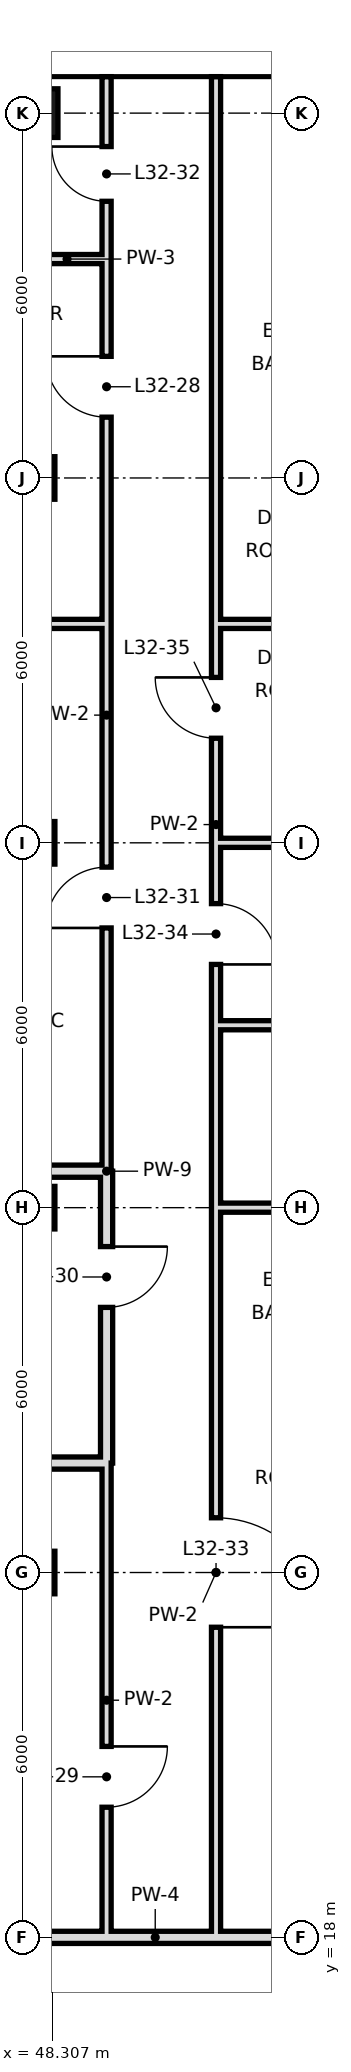
"""IFC4 building model, lengths in metres.
Left out: names, types, materials, properties, quantities, classifications, styles, units other than length and angle.
Written with IfcOpenShell. Run it as: python <this file> out.ifc"""

import sys

from ifc_helpers import new_model, si_unit, direction, frame, frame_2d, origin, origin_2d, place, context, subcontext, project, spatial, rectangle, hollow_rectangle, extrude, element, fill, save


model = new_model("IFC4")
c1 = context("Model", 3, precision=1e-05, world=origin(), true_north=direction((0.0, 1.0)))
c2 = subcontext(c1, "Body", "Model", "MODEL_VIEW")
j1 = project(units=[si_unit("LENGTHUNIT", "METRE"), si_unit("PLANEANGLEUNIT", "RADIAN")], contexts=[c1])
p1 = place(None, origin())
s1 = spatial("IfcSite", under=j1, at=p1, CompositionType="ELEMENT")
p2 = place(p1, origin())
s2 = spatial("IfcBuilding", under=s1, at=p2, CompositionType="ELEMENT")
p3 = place(p2, frame((0.0, 0.0, 143.8)))
s3 = spatial("IfcBuildingStorey", under=s2, at=p3, CompositionType="ELEMENT", Elevation=143.8)
for number, where, z_axis, x_axis in (
    (1, (48.0, 24.0, 0.0), (0.0, 0.0, 1.0), (1.0, 0.0, 0.0)),
    (2, (48.0, 30.0, 0.0), (0.0, 0.0, 1.0), (1.0, 0.0, 0.0)),
    (3, (48.0, 36.0, 0.0), (0.0, 0.0, 1.0), (1.0, 0.0, 0.0)),
    (4, (48.0, 42.0, 0.0), (0.0, 0.0, 1.0), (1.0, 0.0, 0.0)),
):
    element("IfcColumn", number, at=place(p3, frame(where, z_axis=z_axis, x_axis=x_axis)), inside=s3, PredefinedType="COLUMN", context=c2, shape_type="SweptSolid", body=[
        extrude(hollow_rectangle(XDim=0.7, YDim=0.7, WallThickness=0.036, at=origin_2d()), origin(), (0.0, 0.0, 1.0), 3.6),
    ])
p4 = place(p3, frame((48.0, 48.0, 0.0), z_axis=(0.0, 0.0, 1.0), x_axis=(1.0, 0.0, 0.0)))
e5 = element("IfcColumn", 5, at=p4, inside=s3, PredefinedType="COLUMN", context=c2, shape_type="SweptSolid", body=[
    extrude(hollow_rectangle(XDim=0.8, YDim=0.8, WallThickness=0.04, at=origin_2d()), origin(), (0.0, 0.0, 1.0), 3.6),
])
p5 = place(p3, frame((49.2, 25.8, 0.0), z_axis=(0.0, 0.0, 1.0), x_axis=(0.0, 1.0, 0.0)))
e6 = element("IfcWall", 6, at=p5, inside=s3, PredefinedType="SOLIDWALL", context=c2, shape_type="SweptSolid", body=[
    extrude(rectangle(XDim=4.8, YDim=0.2, at=frame_2d((2.4, 0.0))), origin(), (0.0, 0.0, 1.0), 2.72),
])
p6 = place(p5, frame((2.56, 0.0, 0.0)))
e7 = element("IfcOpeningElement", 7, at=p6, cuts=e6, PredefinedType="OPENING", context=c2, shape_type="SweptSolid", body=[
    extrude(rectangle(XDim=1.0, YDim=2.4, at=frame_2d((0.5, 1.2))), frame((0.0, 0.11, 0.0), z_axis=(0.0, -1.0, 0.0), x_axis=(1.0, 0.0, 0.0)), (0.0, 0.0, 1.0), 0.22),
])
p7 = place(p3, frame((49.2, 18.0, 0.0), z_axis=(0.0, 0.0, 1.0), x_axis=(0.0, 1.0, 0.0)))
e8 = element("IfcWall", 8, at=p7, inside=s3, PredefinedType="PARTITIONING", context=c2, shape_type="SweptSolid", body=[
    extrude(rectangle(XDim=7.8, YDim=0.15, at=frame_2d((3.9, 0.0))), origin(), (0.0, 0.0, 1.0), 3.42),
])
p8 = place(p7, frame((2.14, 0.0, 0.0)))
e9 = element("IfcOpeningElement", 9, at=p8, cuts=e8, PredefinedType="OPENING", context=c2, shape_type="SweptSolid", body=[
    extrude(rectangle(XDim=1.0, YDim=2.4, at=frame_2d((0.5, 1.2))), frame((0.0, 0.085, 0.0), z_axis=(0.0, -1.0, 0.0), x_axis=(1.0, 0.0, 0.0)), (0.0, 0.0, 1.0), 0.17),
])
p9 = place(p3, frame((49.2, 30.6, 0.0), z_axis=(0.0, 0.0, 1.0), x_axis=(0.0, 1.0, 0.0)))
e10 = element("IfcWall", 10, at=p9, inside=s3, PredefinedType="PARTITIONING", context=c2, shape_type="SweptSolid", body=[
    extrude(rectangle(XDim=15.0, YDim=0.15, at=frame_2d((7.5, 0.0))), origin(), (0.0, 0.0, 1.0), 3.42),
])
p10 = place(p9, frame((12.4, 0.0, 0.0)))
e11 = element("IfcOpeningElement", 11, at=p10, cuts=e10, PredefinedType="OPENING", context=c2, shape_type="SweptSolid", body=[
    extrude(rectangle(XDim=1.0, YDim=2.4, at=frame_2d((0.5, 1.2))), frame((0.0, 0.085, 0.0), z_axis=(0.0, -1.0, 0.0), x_axis=(1.0, 0.0, 0.0)), (0.0, 0.0, 1.0), 0.17),
])
p11 = place(p9, frame((4.0, 0.0, 0.0)))
e12 = element("IfcOpeningElement", 12, at=p11, cuts=e10, PredefinedType="OPENING", context=c2, shape_type="SweptSolid", body=[
    extrude(rectangle(XDim=1.0, YDim=2.4, at=frame_2d((0.5, 1.2))), frame((0.0, 0.085, 0.0), z_axis=(0.0, -1.0, 0.0), x_axis=(1.0, 0.0, 0.0)), (0.0, 0.0, 1.0), 0.17),
])
p12 = place(p3, frame((49.2, 45.6, 0.0), z_axis=(0.0, 0.0, 1.0), x_axis=(0.0, 1.0, 0.0)))
e13 = element("IfcWall", 13, at=p12, inside=s3, PredefinedType="PARTITIONING", context=c2, shape_type="SweptSolid", body=[
    extrude(rectangle(XDim=3.0, YDim=0.15, at=frame_2d((1.5, 0.0))), origin(), (0.0, 0.0, 1.0), 3.42),
])
p13 = place(p12, frame((0.95, 0.0, 0.0)))
e14 = element("IfcOpeningElement", 14, at=p13, cuts=e13, PredefinedType="OPENING", context=c2, shape_type="SweptSolid", body=[
    extrude(rectangle(XDim=0.9, YDim=2.4, at=frame_2d((0.45, 1.2))), frame((0.0, 0.085, 0.0), z_axis=(0.0, -1.0, 0.0), x_axis=(1.0, 0.0, 0.0)), (0.0, 0.0, 1.0), 0.17),
])
p14 = place(p3, frame((51.0, 18.0, 0.0), z_axis=(0.0, 0.0, 1.0), x_axis=(0.0, 1.0, 0.0)))
e15 = element("IfcWall", 15, at=p14, inside=s3, PredefinedType="PARTITIONING", context=c2, shape_type="SweptSolid", body=[
    extrude(rectangle(XDim=12.0, YDim=0.15, at=frame_2d((6.0, 0.0))), origin(), (0.0, 0.0, 1.0), 3.42),
])
p15 = place(p14, frame((5.1, 0.0, 0.0)))
e16 = element("IfcOpeningElement", 16, at=p15, cuts=e15, PredefinedType="OPENING", context=c2, shape_type="SweptSolid", body=[
    extrude(rectangle(XDim=1.8, YDim=2.4, at=frame_2d((0.9, 1.2))), frame((0.0, 0.085, 0.0), z_axis=(0.0, -1.0, 0.0), x_axis=(1.0, 0.0, 0.0)), (0.0, 0.0, 1.0), 0.17),
])
p16 = place(p3, frame((51.0, 33.0, 0.0), z_axis=(0.0, 0.0, 1.0), x_axis=(0.0, 1.0, 0.0)))
e17 = element("IfcWall", 17, at=p16, inside=s3, PredefinedType="PARTITIONING", context=c2, shape_type="SweptSolid", body=[
    extrude(rectangle(XDim=6.6, YDim=0.15, at=frame_2d((3.3, 0.0))), origin(), (0.0, 0.0, 1.0), 3.42),
])
p17 = place(p16, frame((1.0, 0.0, 0.0)))
e18 = element("IfcOpeningElement", 18, at=p17, cuts=e17, PredefinedType="OPENING", context=c2, shape_type="SweptSolid", body=[
    extrude(rectangle(XDim=1.0, YDim=2.4, at=frame_2d((0.5, 1.2))), frame((0.0, 0.085, 0.0), z_axis=(0.0, -1.0, 0.0), x_axis=(1.0, 0.0, 0.0)), (0.0, 0.0, 1.0), 0.17),
])
p18 = place(p16, frame((4.72, 0.0, 0.0)))
e19 = element("IfcOpeningElement", 19, at=p18, cuts=e17, PredefinedType="OPENING", context=c2, shape_type="SweptSolid", body=[
    extrude(rectangle(XDim=1.0, YDim=2.4, at=frame_2d((0.5, 1.2))), frame((0.0, 0.085, 0.0), z_axis=(0.0, -1.0, 0.0), x_axis=(1.0, 0.0, 0.0)), (0.0, 0.0, 1.0), 0.17),
])
p19 = place(p3, frame((51.0, 30.0, 0.0), z_axis=(0.0, 0.0, 1.0), x_axis=(0.0, 1.0, 0.0)))
e20 = element("IfcWall", 20, at=p19, inside=s3, PredefinedType="PARTITIONING", context=c2, shape_type="SweptSolid", body=[
    extrude(rectangle(XDim=3.0, YDim=0.15, at=frame_2d((1.5, 0.0))), origin(), (0.0, 0.0, 1.0), 3.42),
])
p20 = place(p3, frame((51.0, 39.6, 0.0), z_axis=(0.0, 0.0, 1.0), x_axis=(0.0, 1.0, 0.0)))
e21 = element("IfcWall", 21, at=p20, inside=s3, PredefinedType="PARTITIONING", context=c2, shape_type="SweptSolid", body=[
    extrude(rectangle(XDim=9.0, YDim=0.15, at=frame_2d((4.5, 0.0))), origin(), (0.0, 0.0, 1.0), 3.42),
])
p21 = place(p3, frame((44.9, 18.0, 0.0), z_axis=(0.0, 0.0, 1.0), x_axis=(1.0, 0.0, 0.0)))
e22 = element("IfcWall", 22, at=p21, inside=s3, PredefinedType="SOLIDWALL", context=c2, shape_type="SweptSolid", body=[
    extrude(rectangle(XDim=10.9, YDim=0.2, at=frame_2d((5.45, 0.0))), origin(), (0.0, 0.0, 1.0), 2.72),
])
p22 = place(p3, frame((44.9, 25.8, 0.0), z_axis=(0.0, 0.0, 1.0), x_axis=(1.0, 0.0, 0.0)))
e23 = element("IfcWall", 23, at=p22, inside=s3, PredefinedType="SOLIDWALL", context=c2, shape_type="SweptSolid", body=[
    extrude(rectangle(XDim=4.3, YDim=0.2, at=frame_2d((2.15, 0.0))), origin(), (0.0, 0.0, 1.0), 2.97),
])
p23 = place(p3, frame((51.0, 30.0, 0.0), z_axis=(0.0, 0.0, 1.0), x_axis=(1.0, 0.0, 0.0)))
e24 = element("IfcWall", 24, at=p23, inside=s3, PredefinedType="PARTITIONING", context=c2, shape_type="SweptSolid", body=[
    extrude(rectangle(XDim=3.0, YDim=0.15, at=frame_2d((1.5, 0.0))), origin(), (0.0, 0.0, 1.0), 2.72),
])
p24 = place(p3, frame((44.9, 30.6, 0.0), z_axis=(0.0, 0.0, 1.0), x_axis=(1.0, 0.0, 0.0)))
e25 = element("IfcWall", 25, at=p24, inside=s3, PredefinedType="SOLIDWALL", context=c2, shape_type="SweptSolid", body=[
    extrude(rectangle(XDim=4.3, YDim=0.2, at=frame_2d((2.15, 0.0))), origin(), (0.0, 0.0, 1.0), 2.97),
])
p25 = place(p3, frame((51.0, 33.0, 0.0), z_axis=(0.0, 0.0, 1.0), x_axis=(1.0, 0.0, 0.0)))
e26 = element("IfcWall", 26, at=p25, inside=s3, PredefinedType="PARTITIONING", context=c2, shape_type="SweptSolid", body=[
    extrude(rectangle(XDim=3.0, YDim=0.15, at=frame_2d((1.5, 0.0))), origin(), (0.0, 0.0, 1.0), 3.42),
])
p26 = place(p3, frame((51.0, 36.0, 0.0), z_axis=(0.0, 0.0, 1.0), x_axis=(1.0, 0.0, 0.0)))
e27 = element("IfcWall", 27, at=p26, inside=s3, PredefinedType="PARTITIONING", context=c2, shape_type="SweptSolid", body=[
    extrude(rectangle(XDim=9.0, YDim=0.15, at=frame_2d((4.5, 0.0))), origin(), (0.0, 0.0, 1.0), 2.72),
])
p27 = place(p3, frame((44.9, 39.6, 0.0), z_axis=(0.0, 0.0, 1.0), x_axis=(1.0, 0.0, 0.0)))
e28 = element("IfcWall", 28, at=p27, inside=s3, PredefinedType="PARTITIONING", context=c2, shape_type="SweptSolid", body=[
    extrude(rectangle(XDim=4.3, YDim=0.15, at=frame_2d((2.15, 0.0))), origin(), (0.0, 0.0, 1.0), 3.42),
])
p28 = place(p3, frame((51.0, 39.6, 0.0), z_axis=(0.0, 0.0, 1.0), x_axis=(1.0, 0.0, 0.0)))
e29 = element("IfcWall", 29, at=p28, inside=s3, PredefinedType="PARTITIONING", context=c2, shape_type="SweptSolid", body=[
    extrude(rectangle(XDim=3.0, YDim=0.15, at=frame_2d((1.5, 0.0))), origin(), (0.0, 0.0, 1.0), 3.42),
])
p29 = place(p3, frame((44.9, 45.6, 0.0), z_axis=(0.0, 0.0, 1.0), x_axis=(1.0, 0.0, 0.0)))
e30 = element("IfcWall", 30, at=p29, inside=s3, PredefinedType="PARTITIONING", context=c2, shape_type="SweptSolid", body=[
    extrude(rectangle(XDim=4.3, YDim=0.15, at=frame_2d((2.15, 0.0))), origin(), (0.0, 0.0, 1.0), 3.42),
])
p30 = place(p10, frame((1.0, 0.0, 0.0), z_axis=(0.0, 0.0, 1.0), x_axis=(-1.0, 0.0, 0.0)))
e31 = element("IfcDoor", 31, at=p30, inside=s3, OperationType="SINGLE_SWING_LEFT", PredefinedType="DOOR", context=c2, shape_type="SweptSolid", body=[
    extrude(rectangle(XDim=1.0, YDim=2.4, at=frame_2d((0.5, 1.2))), frame((0.0, 0.025, 0.0), z_axis=(0.0, -1.0, 0.0), x_axis=(1.0, 0.0, 0.0)), (0.0, 0.0, 1.0), 0.05),
])
fill(e11, e31)
p31 = place(p8, origin())
e32 = element("IfcDoor", 32, at=p31, inside=s3, OperationType="SINGLE_SWING_RIGHT", PredefinedType="DOOR", context=c2, shape_type="SweptSolid", body=[
    extrude(rectangle(XDim=1.0, YDim=2.4, at=frame_2d((0.5, 1.2))), frame((0.0, 0.025, 0.0), z_axis=(0.0, -1.0, 0.0), x_axis=(1.0, 0.0, 0.0)), (0.0, 0.0, 1.0), 0.05),
])
fill(e9, e32)
p32 = place(p6, origin())
e33 = element("IfcDoor", 33, at=p32, inside=s3, OperationType="SINGLE_SWING_RIGHT", PredefinedType="DOOR", context=c2, shape_type="SweptSolid", body=[
    extrude(rectangle(XDim=1.0, YDim=2.4, at=frame_2d((0.5, 1.2))), frame((0.0, 0.025, 0.0), z_axis=(0.0, -1.0, 0.0), x_axis=(1.0, 0.0, 0.0)), (0.0, 0.0, 1.0), 0.05),
])
fill(e7, e33)
p33 = place(p11, origin())
e34 = element("IfcDoor", 34, at=p33, inside=s3, OperationType="SINGLE_SWING_LEFT", PredefinedType="DOOR", context=c2, shape_type="SweptSolid", body=[
    extrude(rectangle(XDim=1.0, YDim=2.4, at=frame_2d((0.5, 1.2))), frame((0.0, 0.025, 0.0), z_axis=(0.0, -1.0, 0.0), x_axis=(1.0, 0.0, 0.0)), (0.0, 0.0, 1.0), 0.05),
])
fill(e12, e34)
p34 = place(p13, frame((0.9, 0.0, 0.0), z_axis=(0.0, 0.0, 1.0), x_axis=(-1.0, 0.0, 0.0)))
e35 = element("IfcDoor", 35, at=p34, inside=s3, OperationType="SINGLE_SWING_LEFT", PredefinedType="DOOR", context=c2, shape_type="SweptSolid", body=[
    extrude(rectangle(XDim=0.9, YDim=2.4, at=frame_2d((0.45, 1.2))), frame((0.0, 0.025, 0.0), z_axis=(0.0, -1.0, 0.0), x_axis=(1.0, 0.0, 0.0)), (0.0, 0.0, 1.0), 0.05),
])
fill(e14, e35)
p35 = place(p15, frame((1.8, 0.0, 0.0), z_axis=(0.0, 0.0, 1.0), x_axis=(-1.0, 0.0, 0.0)))
e36 = element("IfcDoor", 36, at=p35, inside=s3, OperationType="SINGLE_SWING_RIGHT", PredefinedType="DOOR", context=c2, shape_type="SweptSolid", body=[
    extrude(rectangle(XDim=1.8, YDim=2.4, at=frame_2d((0.9, 1.2))), frame((0.0, 0.025, 0.0), z_axis=(0.0, -1.0, 0.0), x_axis=(1.0, 0.0, 0.0)), (0.0, 0.0, 1.0), 0.05),
])
fill(e16, e36)
p36 = place(p17, frame((1.0, 0.0, 0.0), z_axis=(0.0, 0.0, 1.0), x_axis=(-1.0, 0.0, 0.0)))
e37 = element("IfcDoor", 37, at=p36, inside=s3, OperationType="SINGLE_SWING_RIGHT", PredefinedType="DOOR", context=c2, shape_type="SweptSolid", body=[
    extrude(rectangle(XDim=1.0, YDim=2.4, at=frame_2d((0.5, 1.2))), frame((0.0, 0.025, 0.0), z_axis=(0.0, -1.0, 0.0), x_axis=(1.0, 0.0, 0.0)), (0.0, 0.0, 1.0), 0.05),
])
fill(e18, e37)
p37 = place(p18, frame((1.0, 0.0, 0.0), z_axis=(0.0, 0.0, 1.0), x_axis=(-1.0, 0.0, 0.0)))
e38 = element("IfcDoor", 38, at=p37, inside=s3, OperationType="SINGLE_SWING_LEFT", PredefinedType="DOOR", context=c2, shape_type="SweptSolid", body=[
    extrude(rectangle(XDim=1.0, YDim=2.4, at=frame_2d((0.5, 1.2))), frame((0.0, 0.025, 0.0), z_axis=(0.0, -1.0, 0.0), x_axis=(1.0, 0.0, 0.0)), (0.0, 0.0, 1.0), 0.05),
])
fill(e19, e38)
save(model, sys.argv[1])
